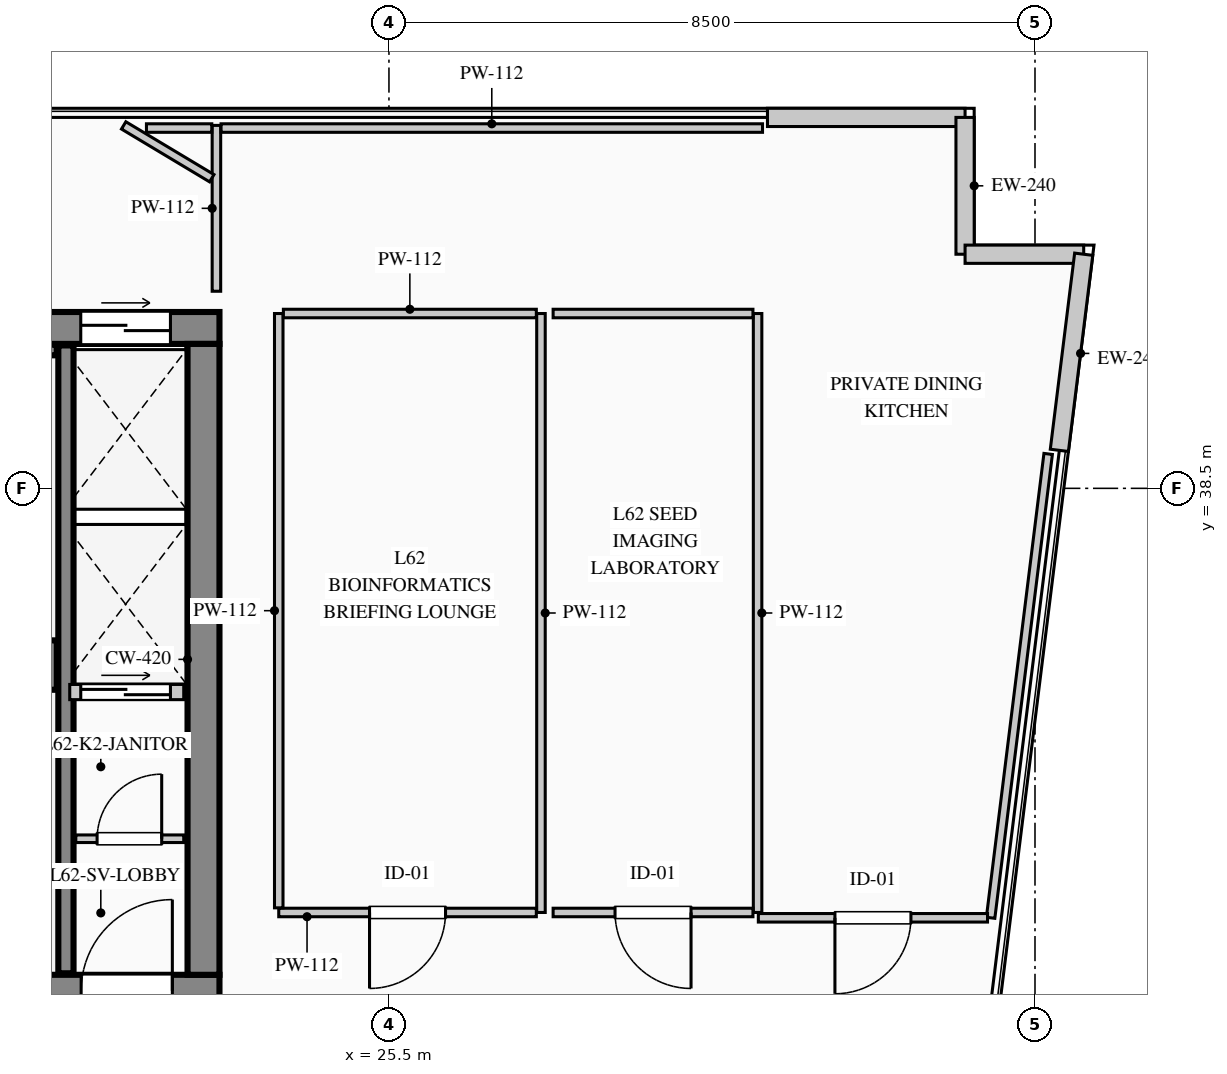
"""IFC4 building model, lengths in metres.
Left out: names, types, materials, properties, quantities, classifications, styles, units other than length and angle.
Written with IfcOpenShell. Run it as: python <this file> out.ifc"""

import sys

from ifc_helpers import new_model, si_unit, direction, frame, frame_2d, origin, place, context, subcontext, project, spatial, rectangle, extrude, element, fill, save


model = new_model("IFC4")
c1 = context("Model", 3, precision=1e-05, world=origin(), true_north=direction((0.0, 1.0)))
c2 = subcontext(c1, "Body", "Model", "MODEL_VIEW")
j1 = project(units=[si_unit("LENGTHUNIT", "METRE"), si_unit("PLANEANGLEUNIT", "RADIAN")], contexts=[c1])
p1 = place(None, origin())
s1 = spatial("IfcSite", under=j1, at=p1, CompositionType="ELEMENT")
p2 = place(p1, origin())
s2 = spatial("IfcBuilding", under=s1, at=p2, CompositionType="ELEMENT")
p3 = place(p2, frame((0.0, 0.0, 260.65)))
s3 = spatial("IfcBuildingStorey", under=s2, at=p3, CompositionType="ELEMENT", Elevation=260.65)
p4 = place(p3, frame((5.58, 40.61, 0.0), z_axis=(0.0, 0.0, 1.0), x_axis=(1.0, 0.0, 0.0)))
e1 = element("IfcWall", 1, at=p4, inside=s3, PredefinedType="SHEAR", context=c2, shape_type="SweptSolid", body=[
    extrude(rectangle(XDim=17.69, YDim=0.42, at=frame_2d((8.845, 0.0))), origin(), (0.0, 0.0, 1.0), 3.95),
])
p5 = place(p4, frame((15.865, 0.0, 0.0)))
e2 = element("IfcOpeningElement", 2, at=p5, cuts=e1, PredefinedType="OPENING", context=c2, shape_type="SweptSolid", body=[
    extrude(rectangle(XDim=1.18, YDim=2.25, at=frame_2d((0.59, 1.125))), frame((0.0, 0.22, 0.0), z_axis=(0.0, -1.0, 0.0), x_axis=(1.0, 0.0, 0.0)), (0.0, 0.0, 1.0), 0.44),
])
p6 = place(p3, frame((5.58, 31.89, 0.0), z_axis=(0.0, 0.0, 1.0), x_axis=(1.0, 0.0, 0.0)))
e3 = element("IfcWall", 3, at=p6, inside=s3, PredefinedType="SHEAR", context=c2, shape_type="SweptSolid", body=[
    extrude(rectangle(XDim=17.69, YDim=0.42, at=frame_2d((8.845, 0.0))), origin(), (0.0, 0.0, 1.0), 3.95),
])
p7 = place(p6, frame((3.07, 0.0, 0.0)))
e4 = element("IfcOpeningElement", 4, at=p7, cuts=e3, PredefinedType="OPENING", context=c2, shape_type="SweptSolid", body=[
    extrude(rectangle(XDim=1.2, YDim=2.2, at=frame_2d((0.6, 1.1))), frame((0.0, 0.22, 0.0), z_axis=(0.0, -1.0, 0.0), x_axis=(1.0, 0.0, 0.0)), (0.0, 0.0, 1.0), 0.44),
])
p8 = place(p6, frame((6.92, 0.0, 0.0)))
e5 = element("IfcOpeningElement", 5, at=p8, cuts=e3, PredefinedType="OPENING", context=c2, shape_type="SweptSolid", body=[
    extrude(rectangle(XDim=1.2, YDim=2.2, at=frame_2d((0.6, 1.1))), frame((0.0, 0.22, 0.0), z_axis=(0.0, -1.0, 0.0), x_axis=(1.0, 0.0, 0.0)), (0.0, 0.0, 1.0), 0.44),
])
p9 = place(p6, frame((8.77, 0.0, 0.0)))
e6 = element("IfcOpeningElement", 6, at=p9, cuts=e3, PredefinedType="OPENING", context=c2, shape_type="SweptSolid", body=[
    extrude(rectangle(XDim=1.15, YDim=2.2, at=frame_2d((0.575, 1.1))), frame((0.0, 0.22, 0.0), z_axis=(0.0, -1.0, 0.0), x_axis=(1.0, 0.0, 0.0)), (0.0, 0.0, 1.0), 0.44),
])
p10 = place(p6, frame((15.87, 0.0, 0.0)))
e7 = element("IfcOpeningElement", 7, at=p10, cuts=e3, PredefinedType="OPENING", context=c2, shape_type="SweptSolid", body=[
    extrude(rectangle(XDim=1.2, YDim=2.2, at=frame_2d((0.6, 1.1))), frame((0.0, 0.22, 0.0), z_axis=(0.0, -1.0, 0.0), x_axis=(1.0, 0.0, 0.0)), (0.0, 0.0, 1.0), 0.44),
])
p11 = place(p3, frame((23.06, 32.1, 0.0), z_axis=(0.0, 0.0, 1.0), x_axis=(0.0, 1.0, 0.0)))
e8 = element("IfcWall", 8, at=p11, inside=s3, PredefinedType="SHEAR", context=c2, shape_type="SweptSolid", body=[
    extrude(rectangle(XDim=8.3, YDim=0.42, at=frame_2d((4.15, 0.0))), origin(), (0.0, 0.0, 1.0), 3.95),
])
p12 = place(p3, frame((14.12, 36.175, 0.0), z_axis=(0.0, 0.0, 1.0), x_axis=(1.0, 0.0, 0.0)))
e9 = element("IfcWall", 9, at=p12, inside=s3, PredefinedType="SHEAR", context=c2, shape_type="SweptSolid", body=[
    extrude(rectangle(XDim=7.01, YDim=0.65, at=frame_2d((3.505, 0.0))), origin(), (0.0, 0.0, 1.0), 3.95),
])
p13 = place(p3, frame((21.25, 32.12, 0.0), z_axis=(0.0, 0.0, 1.0), x_axis=(0.0, 1.0, 0.0)))
e10 = element("IfcWall", 10, at=p13, inside=s3, PredefinedType="SHEAR", context=c2, shape_type="SweptSolid", body=[
    extrude(rectangle(XDim=8.26, YDim=0.2, at=frame_2d((4.13, 0.0))), origin(), (0.0, 0.0, 1.0), 3.95),
])
p14 = place(p3, frame((14.12, 40.32, 0.0), z_axis=(0.0, 0.0, 1.0), x_axis=(1.0, 0.0, 0.0)))
e11 = element("IfcWall", 11, at=p14, inside=s3, PredefinedType="SHEAR", context=c2, shape_type="SweptSolid", body=[
    extrude(rectangle(XDim=7.01, YDim=0.14, at=frame_2d((3.505, 0.0))), origin(), (0.0, 0.0, 1.0), 3.95),
])
p15 = place(p3, frame((30.48, 43.38, 0.0), z_axis=(0.0, 0.0, 1.0), x_axis=(1.0, 0.0, 0.0)))
e12 = element("IfcWall", 12, at=p15, inside=s3, PredefinedType="STANDARD", context=c2, shape_type="SweptSolid", body=[
    extrude(rectangle(XDim=2.6, YDim=0.24, at=frame_2d((1.3, 0.0))), origin(), (0.0, 0.0, 1.0), 3.7),
])
p16 = place(p3, frame((33.08, 43.38, 0.0), z_axis=(0.0, 0.0, 1.0), x_axis=(0.0, -1.0, 0.0)))
e13 = element("IfcWall", 13, at=p16, inside=s3, PredefinedType="STANDARD", context=c2, shape_type="SweptSolid", body=[
    extrude(rectangle(XDim=1.8, YDim=0.24, at=frame_2d((0.9, 0.0))), origin(), (0.0, 0.0, 1.0), 3.7),
])
p17 = place(p3, frame((33.08, 41.58, 0.0), z_axis=(0.0, 0.0, 1.0), x_axis=(1.0, 0.0, 0.0)))
e14 = element("IfcWall", 14, at=p17, inside=s3, PredefinedType="STANDARD", context=c2, shape_type="SweptSolid", body=[
    extrude(rectangle(XDim=1.561, YDim=0.24, at=frame_2d((0.78, 0.0))), origin(), (0.0, 0.0, 1.0), 3.7),
])
p18 = place(p3, frame((34.641, 41.58, 0.0), z_axis=(0.0, 0.0, 1.0), x_axis=(-0.123191073593, -0.992382970121, 0.0)))
e15 = element("IfcWall", 15, at=p18, inside=s3, PredefinedType="STANDARD", context=c2, shape_type="SweptSolid", body=[
    extrude(rectangle(XDim=2.6, YDim=0.24, at=frame_2d((1.3, 0.0))), origin(), (0.0, 0.0, 1.0), 3.7),
])
p19 = place(p3, frame((21.38, 33.89, 0.0), z_axis=(0.0, 0.0, 1.0), x_axis=(1.0, 0.0, 0.0)))
e16 = element("IfcWall", 16, at=p19, inside=s3, PredefinedType="PARTITIONING", context=c2, shape_type="SweptSolid", body=[
    extrude(rectangle(XDim=1.42, YDim=0.1, at=frame_2d((0.71, 0.0))), origin(), (0.0, 0.0, 1.0), 3.7),
])
p20 = place(p19, frame((0.28, 0.0, 0.0)))
e17 = element("IfcOpeningElement", 17, at=p20, cuts=e16, PredefinedType="OPENING", context=c2, shape_type="SweptSolid", body=[
    extrude(rectangle(XDim=0.85, YDim=2.1, at=frame_2d((0.425, 1.05))), frame((0.0, 0.06, 0.0), z_axis=(0.0, -1.0, 0.0), x_axis=(1.0, 0.0, 0.0)), (0.0, 0.0, 1.0), 0.12),
])
p21 = place(p3, frame((21.3, 35.82, 0.0), z_axis=(0.0, 0.0, 1.0), x_axis=(1.0, 0.0, 0.0)))
e18 = element("IfcWall", 18, at=p21, inside=s3, PredefinedType="PARTITIONING", context=c2, shape_type="SweptSolid", body=[
    extrude(rectangle(XDim=1.5, YDim=0.2, at=frame_2d((0.75, 0.0))), origin(), (0.0, 0.0, 1.0), 3.7),
])
p22 = place(p21, frame((0.145, 0.0, 0.0)))
e19 = element("IfcOpeningElement", 19, at=p22, cuts=e18, PredefinedType="OPENING", context=c2, shape_type="SweptSolid", body=[
    extrude(rectangle(XDim=1.18, YDim=2.25, at=frame_2d((0.59, 1.125))), frame((0.0, 0.11, 0.0), z_axis=(0.0, -1.0, 0.0), x_axis=(1.0, 0.0, 0.0)), (0.0, 0.0, 1.0), 0.22),
])
p23 = place(p3, frame((27.5, 40.8, 0.0), z_axis=(0.0, 0.0, 1.0), x_axis=(0.0, -1.0, 0.0)))
e20 = element("IfcWall", 20, at=p23, inside=s3, PredefinedType="PARTITIONING", context=c2, shape_type="SweptSolid", body=[
    extrude(rectangle(XDim=7.88, YDim=0.112, at=frame_2d((3.94, 0.0))), origin(), (0.0, 0.0, 1.0), 3.7),
])
p24 = place(p3, frame((27.439, 32.92, 0.0), z_axis=(0.0, 0.0, 1.0), x_axis=(-1.0, 0.0, 0.0)))
e21 = element("IfcWall", 21, at=p24, inside=s3, PredefinedType="PARTITIONING", context=c2, shape_type="SweptSolid", body=[
    extrude(rectangle(XDim=3.389, YDim=0.112, at=frame_2d((1.694, 0.0))), origin(), (0.0, 0.0, 1.0), 3.7),
])
p25 = place(p24, frame((1.195, 0.0, 0.0)))
e22 = element("IfcOpeningElement", 22, at=p25, cuts=e21, PredefinedType="OPENING", context=c2, shape_type="SweptSolid", body=[
    extrude(rectangle(XDim=1.0, YDim=2.15, at=frame_2d((0.5, 1.075))), frame((0.0, 0.066, 0.0), z_axis=(0.0, -1.0, 0.0), x_axis=(1.0, 0.0, 0.0)), (0.0, 0.0, 1.0), 0.132),
])
p26 = place(p3, frame((24.05, 32.981, 0.0), z_axis=(0.0, 0.0, 1.0), x_axis=(0.0, 1.0, 0.0)))
e23 = element("IfcWall", 23, at=p26, inside=s3, PredefinedType="PARTITIONING", context=c2, shape_type="SweptSolid", body=[
    extrude(rectangle(XDim=7.819, YDim=0.112, at=frame_2d((3.91, 0.0))), origin(), (0.0, 0.0, 1.0), 3.7),
])
p27 = place(p3, frame((24.111, 40.8, 0.0), z_axis=(0.0, 0.0, 1.0), x_axis=(1.0, 0.0, 0.0)))
e24 = element("IfcWall", 24, at=p27, inside=s3, PredefinedType="PARTITIONING", context=c2, shape_type="SweptSolid", body=[
    extrude(rectangle(XDim=3.328, YDim=0.112, at=frame_2d((1.664, 0.0))), origin(), (0.0, 0.0, 1.0), 3.7),
])
p28 = place(p3, frame((30.35, 40.8, 0.0), z_axis=(0.0, 0.0, 1.0), x_axis=(0.0, -1.0, 0.0)))
e25 = element("IfcWall", 25, at=p28, inside=s3, PredefinedType="PARTITIONING", context=c2, shape_type="SweptSolid", body=[
    extrude(rectangle(XDim=7.88, YDim=0.112, at=frame_2d((3.94, 0.0))), origin(), (0.0, 0.0, 1.0), 3.7),
])
p29 = place(p3, frame((30.289, 32.92, 0.0), z_axis=(0.0, 0.0, 1.0), x_axis=(-1.0, 0.0, 0.0)))
e26 = element("IfcWall", 26, at=p29, inside=s3, PredefinedType="PARTITIONING", context=c2, shape_type="SweptSolid", body=[
    extrude(rectangle(XDim=2.629, YDim=0.112, at=frame_2d((1.314, 0.0))), origin(), (0.0, 0.0, 1.0), 3.7),
])
p30 = place(p29, frame((0.814, 0.0, 0.0)))
e27 = element("IfcOpeningElement", 27, at=p30, cuts=e26, PredefinedType="OPENING", context=c2, shape_type="SweptSolid", body=[
    extrude(rectangle(XDim=1.0, YDim=2.15, at=frame_2d((0.5, 1.075))), frame((0.0, 0.066, 0.0), z_axis=(0.0, -1.0, 0.0), x_axis=(1.0, 0.0, 0.0)), (0.0, 0.0, 1.0), 0.132),
])
p31 = place(p3, frame((27.66, 40.8, 0.0), z_axis=(0.0, 0.0, 1.0), x_axis=(1.0, 0.0, 0.0)))
e28 = element("IfcWall", 28, at=p31, inside=s3, PredefinedType="PARTITIONING", context=c2, shape_type="SweptSolid", body=[
    extrude(rectangle(XDim=2.629, YDim=0.112, at=frame_2d((1.314, 0.0))), origin(), (0.0, 0.0, 1.0), 3.7),
])
p32 = place(p3, frame((23.23, 41.093, 0.0), z_axis=(0.0, 0.0, 1.0), x_axis=(0.0, 1.0, 0.0)))
e29 = element("IfcWall", 29, at=p32, inside=s3, PredefinedType="PARTITIONING", context=c2, shape_type="SweptSolid", body=[
    extrude(rectangle(XDim=2.182, YDim=0.112, at=frame_2d((1.091, 0.0))), origin(), (0.0, 0.0, 1.0), 3.7),
])
p33 = place(p3, frame((23.169, 42.58, 0.0), z_axis=(0.0, 0.0, 1.0), x_axis=(-0.857763736618, 0.514044134431, 0.0)))
e30 = element("IfcWall", 30, at=p33, inside=s3, PredefinedType="PARTITIONING", context=c2, shape_type="SweptSolid", body=[
    extrude(rectangle(XDim=1.352, YDim=0.112, at=frame_2d((0.676, 0.0))), origin(), (0.0, 0.0, 1.0), 3.7),
])
p34 = place(p3, frame((22.309, 43.24, 0.0), z_axis=(0.0, 0.0, 1.0), x_axis=(1.0, 0.0, 0.0)))
e31 = element("IfcWall", 31, at=p34, inside=s3, PredefinedType="PARTITIONING", context=c2, shape_type="SweptSolid", body=[
    extrude(rectangle(XDim=0.86, YDim=0.112, at=frame_2d((0.43, 0.0))), origin(), (0.0, 0.0, 1.0), 3.7),
])
p35 = place(p3, frame((23.291, 43.24, 0.0), z_axis=(0.0, 0.0, 1.0), x_axis=(1.0, 0.0, 0.0)))
e32 = element("IfcWall", 32, at=p35, inside=s3, PredefinedType="PARTITIONING", context=c2, shape_type="SweptSolid", body=[
    extrude(rectangle(XDim=7.124, YDim=0.112, at=frame_2d((3.562, 0.0))), origin(), (0.0, 0.0, 1.0), 3.7),
])
p36 = place(p3, frame((34.173, 38.953, 0.0), z_axis=(0.0, 0.0, 1.0), x_axis=(-0.123155137196, -0.992387430484, 0.0)))
e33 = element("IfcWall", 33, at=p36, inside=s3, PredefinedType="PARTITIONING", context=c2, shape_type="SweptSolid", body=[
    extrude(rectangle(XDim=6.149, YDim=0.112, at=frame_2d((3.075, 0.0))), origin(), (0.0, 0.0, 1.0), 3.7),
])
p37 = place(p3, frame((33.375, 32.85, 0.0), z_axis=(0.0, 0.0, 1.0), x_axis=(-1.0, 0.0, 0.0)))
e34 = element("IfcWall", 34, at=p37, inside=s3, PredefinedType="PARTITIONING", context=c2, shape_type="SweptSolid", body=[
    extrude(rectangle(XDim=3.015, YDim=0.112, at=frame_2d((1.508, 0.0))), origin(), (0.0, 0.0, 1.0), 3.7),
])
p38 = place(p37, frame((1.008, 0.0, 0.0)))
e35 = element("IfcOpeningElement", 35, at=p38, cuts=e34, PredefinedType="OPENING", context=c2, shape_type="SweptSolid", body=[
    extrude(rectangle(XDim=1.0, YDim=2.15, at=frame_2d((0.5, 1.075))), frame((0.0, 0.066, 0.0), z_axis=(0.0, -1.0, 0.0), x_axis=(1.0, 0.0, 0.0)), (0.0, 0.0, 1.0), 0.132),
])
p39 = place(p10, origin())
e36 = element("IfcDoor", 36, at=p39, inside=s3, OperationType="SINGLE_SWING_RIGHT", PredefinedType="DOOR", context=c2, shape_type="SweptSolid", body=[
    extrude(rectangle(XDim=1.2, YDim=2.2, at=frame_2d((0.6, 1.1))), frame((0.0, 0.025, 0.0), z_axis=(0.0, -1.0, 0.0), x_axis=(1.0, 0.0, 0.0)), (0.0, 0.0, 1.0), 0.05),
])
fill(e7, e36)
p40 = place(p20, origin())
e37 = element("IfcDoor", 37, at=p40, inside=s3, OperationType="SINGLE_SWING_RIGHT", PredefinedType="DOOR", context=c2, shape_type="SweptSolid", body=[
    extrude(rectangle(XDim=0.85, YDim=2.1, at=frame_2d((0.425, 1.05))), frame((0.0, 0.025, 0.0), z_axis=(0.0, -1.0, 0.0), x_axis=(1.0, 0.0, 0.0)), (0.0, 0.0, 1.0), 0.05),
])
fill(e17, e37)
p41 = place(p5, origin())
e38 = element("IfcDoor", 38, at=p41, inside=s3, OperationType="DOUBLE_DOOR_SLIDING", PredefinedType="DOOR", context=c2, shape_type="SweptSolid", body=[
    extrude(rectangle(XDim=1.18, YDim=2.25, at=frame_2d((0.59, 1.125))), frame((0.0, 0.025, 0.0), z_axis=(0.0, -1.0, 0.0), x_axis=(1.0, 0.0, 0.0)), (0.0, 0.0, 1.0), 0.05),
])
fill(e2, e38)
p42 = place(p22, origin())
e39 = element("IfcDoor", 39, at=p42, inside=s3, OperationType="DOUBLE_DOOR_SLIDING", PredefinedType="DOOR", context=c2, shape_type="SweptSolid", body=[
    extrude(rectangle(XDim=1.18, YDim=2.25, at=frame_2d((0.59, 1.125))), frame((0.0, 0.025, 0.0), z_axis=(0.0, -1.0, 0.0), x_axis=(1.0, 0.0, 0.0)), (0.0, 0.0, 1.0), 0.05),
])
fill(e19, e39)
p43 = place(p25, origin())
e40 = element("IfcDoor", 40, at=p43, inside=s3, OperationType="SINGLE_SWING_RIGHT", PredefinedType="DOOR", context=c2, shape_type="SweptSolid", body=[
    extrude(rectangle(XDim=1.0, YDim=2.15, at=frame_2d((0.5, 1.075))), frame((0.0, 0.025, 0.0), z_axis=(0.0, -1.0, 0.0), x_axis=(1.0, 0.0, 0.0)), (0.0, 0.0, 1.0), 0.05),
])
fill(e22, e40)
p44 = place(p30, origin())
e41 = element("IfcDoor", 41, at=p44, inside=s3, OperationType="SINGLE_SWING_LEFT", PredefinedType="DOOR", context=c2, shape_type="SweptSolid", body=[
    extrude(rectangle(XDim=1.0, YDim=2.15, at=frame_2d((0.5, 1.075))), frame((0.0, 0.025, 0.0), z_axis=(0.0, -1.0, 0.0), x_axis=(1.0, 0.0, 0.0)), (0.0, 0.0, 1.0), 0.05),
])
fill(e27, e41)
p45 = place(p38, origin())
e42 = element("IfcDoor", 42, at=p45, inside=s3, OperationType="SINGLE_SWING_RIGHT", PredefinedType="DOOR", context=c2, shape_type="SweptSolid", body=[
    extrude(rectangle(XDim=1.0, YDim=2.15, at=frame_2d((0.5, 1.075))), frame((0.0, 0.025, 0.0), z_axis=(0.0, -1.0, 0.0), x_axis=(1.0, 0.0, 0.0)), (0.0, 0.0, 1.0), 0.05),
])
fill(e35, e42)
save(model, sys.argv[1])
